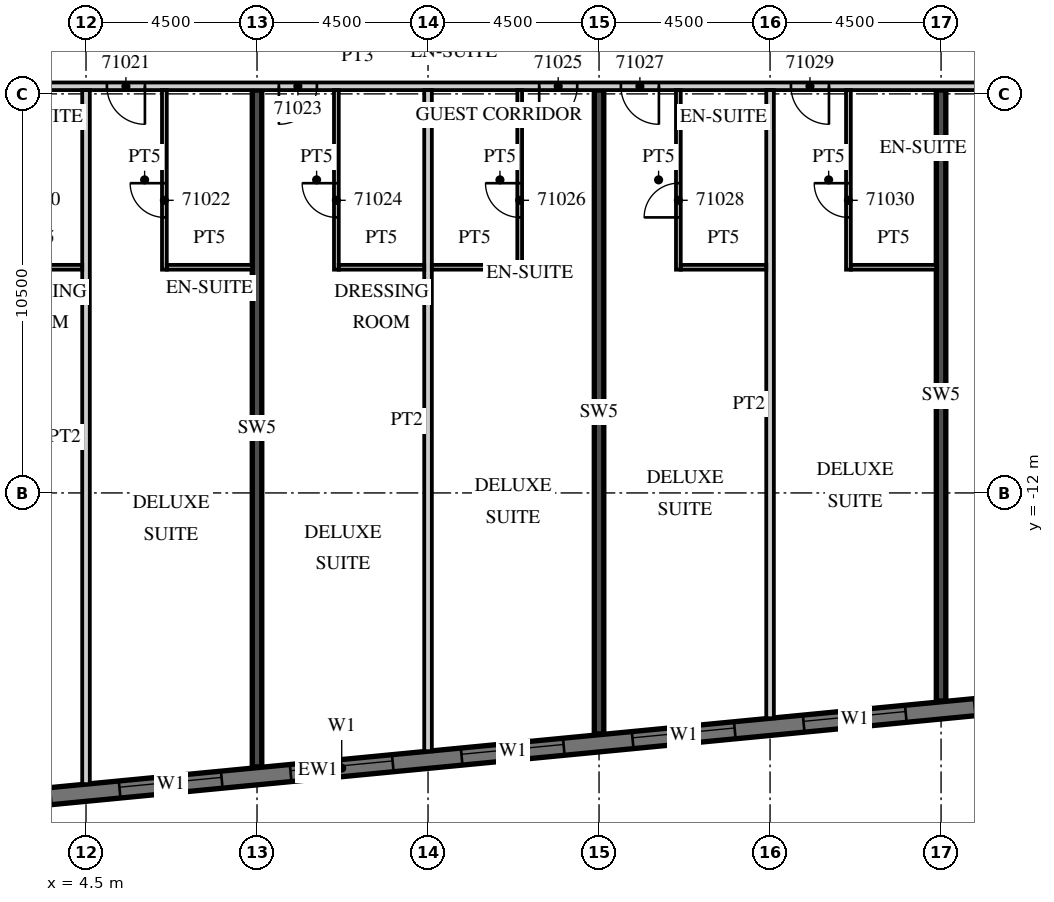
"""IFC4 building model, lengths in metres.
Left out: names, types, materials, properties, quantities, classifications, styles, units other than length and angle.
Written with IfcOpenShell. Run it as: python <this file> out.ifc"""

import sys

from ifc_helpers import new_model, si_unit, direction, frame, frame_2d, origin, place, context, subcontext, project, spatial, rectangle, extrude, element, fill, save


model = new_model("IFC4")
c1 = context("Model", 3, precision=1e-05, world=origin(), true_north=direction((0.0, 1.0)))
c2 = subcontext(c1, "Body", "Model", "MODEL_VIEW")
j1 = project(units=[si_unit("LENGTHUNIT", "METRE"), si_unit("PLANEANGLEUNIT", "RADIAN")], contexts=[c1])
p1 = place(None, origin())
s1 = spatial("IfcSite", under=j1, at=p1, CompositionType="ELEMENT")
p2 = place(p1, origin())
s2 = spatial("IfcBuilding", under=s1, at=p2, CompositionType="ELEMENT")
p3 = place(p2, frame((0.0, 0.0, 285.0)))
s3 = spatial("IfcBuildingStorey", under=s2, at=p3, CompositionType="ELEMENT", Elevation=285.0)
p4 = place(p3, frame((9.0, -19.207, 0.0), z_axis=(0.0, 0.0, 1.0), x_axis=(0.0, 1.0, 0.0)))
e1 = element("IfcWall", 1, at=p4, inside=s3, PredefinedType="SHEAR", context=c2, shape_type="SweptSolid", body=[
    extrude(rectangle(XDim=17.807, YDim=0.25, at=frame_2d((8.904, 0.0))), origin(), (0.0, 0.0, 1.0), 3.3),
])
p5 = place(p3, frame((18.0, -18.341, 0.0), z_axis=(0.0, 0.0, 1.0), x_axis=(0.0, 1.0, 0.0)))
e2 = element("IfcWall", 2, at=p5, inside=s3, PredefinedType="SHEAR", context=c2, shape_type="SweptSolid", body=[
    extrude(rectangle(XDim=16.941, YDim=0.25, at=frame_2d((8.47, 0.0))), origin(), (0.0, 0.0, 1.0), 3.3),
])
p6 = place(p3, frame((27.0, -17.474, 0.0), z_axis=(0.0, 0.0, 1.0), x_axis=(0.0, 1.0, 0.0)))
e3 = element("IfcWall", 3, at=p6, inside=s3, PredefinedType="SHEAR", context=c2, shape_type="SweptSolid", body=[
    extrude(rectangle(XDim=16.074, YDim=0.25, at=frame_2d((8.037, 0.0))), origin(), (0.0, 0.0, 1.0), 3.3),
])
p7 = place(p3, frame((-13.521, -21.624, 0.0), z_axis=(0.0, 0.0, 1.0), x_axis=(0.995396186218, 0.095845878695, 0.0)))
e4 = element("IfcWall", 4, at=p7, inside=s3, PredefinedType="SOLIDWALL", context=c2, shape_type="SweptSolid", body=[
    extrude(rectangle(XDim=48.481, YDim=0.45, at=frame_2d((24.241, 0.0))), origin(), (0.0, 0.0, 1.0), 3.02),
])
p8 = place(p7, frame((0.91, 0.0, 0.45)))
e5 = element("IfcOpeningElement", 5, at=p8, cuts=e4, PredefinedType="OPENING", context=c2, shape_type="SweptSolid", body=[
    extrude(rectangle(XDim=2.7, YDim=2.25, at=frame_2d((1.35, 1.125))), frame((0.0, 0.235, 0.0), z_axis=(0.0, -1.0, 0.0), x_axis=(1.0, 0.0, 0.0)), (0.0, 0.0, 1.0), 0.47),
])
p9 = place(p7, frame((5.431, 0.0, 0.45)))
e6 = element("IfcOpeningElement", 6, at=p9, cuts=e4, PredefinedType="OPENING", context=c2, shape_type="SweptSolid", body=[
    extrude(rectangle(XDim=2.7, YDim=2.25, at=frame_2d((1.35, 1.125))), frame((0.0, 0.235, 0.0), z_axis=(0.0, -1.0, 0.0), x_axis=(1.0, 0.0, 0.0)), (0.0, 0.0, 1.0), 0.47),
])
p10 = place(p7, frame((9.952, 0.0, 0.45)))
e7 = element("IfcOpeningElement", 7, at=p10, cuts=e4, PredefinedType="OPENING", context=c2, shape_type="SweptSolid", body=[
    extrude(rectangle(XDim=2.7, YDim=2.25, at=frame_2d((1.35, 1.125))), frame((0.0, 0.235, 0.0), z_axis=(0.0, -1.0, 0.0), x_axis=(1.0, 0.0, 0.0)), (0.0, 0.0, 1.0), 0.47),
])
p11 = place(p7, frame((14.473, 0.0, 0.45)))
e8 = element("IfcOpeningElement", 8, at=p11, cuts=e4, PredefinedType="OPENING", context=c2, shape_type="SweptSolid", body=[
    extrude(rectangle(XDim=2.7, YDim=2.25, at=frame_2d((1.35, 1.125))), frame((0.0, 0.235, 0.0), z_axis=(0.0, -1.0, 0.0), x_axis=(1.0, 0.0, 0.0)), (0.0, 0.0, 1.0), 0.47),
])
p12 = place(p7, frame((18.994, 0.0, 0.45)))
e9 = element("IfcOpeningElement", 9, at=p12, cuts=e4, PredefinedType="OPENING", context=c2, shape_type="SweptSolid", body=[
    extrude(rectangle(XDim=2.7, YDim=2.25, at=frame_2d((1.35, 1.125))), frame((0.0, 0.235, 0.0), z_axis=(0.0, -1.0, 0.0), x_axis=(1.0, 0.0, 0.0)), (0.0, 0.0, 1.0), 0.47),
])
p13 = place(p7, frame((23.514, 0.0, 0.45)))
e10 = element("IfcOpeningElement", 10, at=p13, cuts=e4, PredefinedType="OPENING", context=c2, shape_type="SweptSolid", body=[
    extrude(rectangle(XDim=2.7, YDim=2.25, at=frame_2d((1.35, 1.125))), frame((0.0, 0.235, 0.0), z_axis=(0.0, -1.0, 0.0), x_axis=(1.0, 0.0, 0.0)), (0.0, 0.0, 1.0), 0.47),
])
p14 = place(p7, frame((28.035, 0.0, 0.45)))
e11 = element("IfcOpeningElement", 11, at=p14, cuts=e4, PredefinedType="OPENING", context=c2, shape_type="SweptSolid", body=[
    extrude(rectangle(XDim=2.7, YDim=2.25, at=frame_2d((1.35, 1.125))), frame((0.0, 0.235, 0.0), z_axis=(0.0, -1.0, 0.0), x_axis=(1.0, 0.0, 0.0)), (0.0, 0.0, 1.0), 0.47),
])
p15 = place(p7, frame((32.556, 0.0, 0.45)))
e12 = element("IfcOpeningElement", 12, at=p15, cuts=e4, PredefinedType="OPENING", context=c2, shape_type="SweptSolid", body=[
    extrude(rectangle(XDim=2.7, YDim=2.25, at=frame_2d((1.35, 1.125))), frame((0.0, 0.235, 0.0), z_axis=(0.0, -1.0, 0.0), x_axis=(1.0, 0.0, 0.0)), (0.0, 0.0, 1.0), 0.47),
])
p16 = place(p7, frame((37.077, 0.0, 0.45)))
e13 = element("IfcOpeningElement", 13, at=p16, cuts=e4, PredefinedType="OPENING", context=c2, shape_type="SweptSolid", body=[
    extrude(rectangle(XDim=2.7, YDim=2.25, at=frame_2d((1.35, 1.125))), frame((0.0, 0.235, 0.0), z_axis=(0.0, -1.0, 0.0), x_axis=(1.0, 0.0, 0.0)), (0.0, 0.0, 1.0), 0.47),
])
p17 = place(p7, frame((41.598, 0.0, 0.45)))
e14 = element("IfcOpeningElement", 14, at=p17, cuts=e4, PredefinedType="OPENING", context=c2, shape_type="SweptSolid", body=[
    extrude(rectangle(XDim=2.7, YDim=2.25, at=frame_2d((1.35, 1.125))), frame((0.0, 0.235, 0.0), z_axis=(0.0, -1.0, 0.0), x_axis=(1.0, 0.0, 0.0)), (0.0, 0.0, 1.0), 0.47),
])
p18 = place(p3, frame((-13.5, -1.3, 0.0), z_axis=(0.0, 0.0, 1.0), x_axis=(1.0, 0.0, 0.0)))
e15 = element("IfcWall", 15, at=p18, inside=s3, PredefinedType="PARTITIONING", context=c2, shape_type="SweptSolid", body=[
    extrude(rectangle(XDim=50.293, YDim=0.2, at=frame_2d((25.146, 0.0))), origin(), (0.0, 0.0, 1.0), 3.02),
])
p19 = place(p18, frame((2.925, 0.0, 0.0)))
e16 = element("IfcOpeningElement", 16, at=p19, cuts=e15, PredefinedType="OPENING", context=c2, shape_type="SweptSolid", body=[
    extrude(rectangle(XDim=1.0, YDim=2.1, at=frame_2d((0.5, 1.05))), frame((0.0, 0.11, 0.0), z_axis=(0.0, -1.0, 0.0), x_axis=(1.0, 0.0, 0.0)), (0.0, 0.0, 1.0), 0.22),
])
p20 = place(p18, frame((6.938, 0.0, 0.0)))
e17 = element("IfcOpeningElement", 17, at=p20, cuts=e15, PredefinedType="OPENING", context=c2, shape_type="SweptSolid", body=[
    extrude(rectangle(XDim=1.2, YDim=2.1, at=frame_2d((0.6, 1.05))), frame((0.0, 0.11, 0.0), z_axis=(0.0, -1.0, 0.0), x_axis=(1.0, 0.0, 0.0)), (0.0, 0.0, 1.0), 0.22),
])
p21 = place(p18, frame((14.075, 0.0, 0.0)))
e18 = element("IfcOpeningElement", 18, at=p21, cuts=e15, PredefinedType="OPENING", context=c2, shape_type="SweptSolid", body=[
    extrude(rectangle(XDim=1.0, YDim=2.1, at=frame_2d((0.5, 1.05))), frame((0.0, 0.11, 0.0), z_axis=(0.0, -1.0, 0.0), x_axis=(1.0, 0.0, 0.0)), (0.0, 0.0, 1.0), 0.22),
])
p22 = place(p18, frame((18.55, 0.0, 0.0)))
e19 = element("IfcOpeningElement", 19, at=p22, cuts=e15, PredefinedType="OPENING", context=c2, shape_type="SweptSolid", body=[
    extrude(rectangle(XDim=1.0, YDim=2.1, at=frame_2d((0.5, 1.05))), frame((0.0, 0.11, 0.0), z_axis=(0.0, -1.0, 0.0), x_axis=(1.0, 0.0, 0.0)), (0.0, 0.0, 1.0), 0.22),
])
p23 = place(p18, frame((23.075, 0.0, 0.0)))
e20 = element("IfcOpeningElement", 20, at=p23, cuts=e15, PredefinedType="OPENING", context=c2, shape_type="SweptSolid", body=[
    extrude(rectangle(XDim=1.0, YDim=2.1, at=frame_2d((0.5, 1.05))), frame((0.0, 0.11, 0.0), z_axis=(0.0, -1.0, 0.0), x_axis=(1.0, 0.0, 0.0)), (0.0, 0.0, 1.0), 0.22),
])
p24 = place(p18, frame((29.925, 0.0, 0.0)))
e21 = element("IfcOpeningElement", 21, at=p24, cuts=e15, PredefinedType="OPENING", context=c2, shape_type="SweptSolid", body=[
    extrude(rectangle(XDim=1.0, YDim=2.1, at=frame_2d((0.5, 1.05))), frame((0.0, 0.11, 0.0), z_axis=(0.0, -1.0, 0.0), x_axis=(1.0, 0.0, 0.0)), (0.0, 0.0, 1.0), 0.22),
])
p25 = place(p18, frame((32.075, 0.0, 0.0)))
e22 = element("IfcOpeningElement", 22, at=p25, cuts=e15, PredefinedType="OPENING", context=c2, shape_type="SweptSolid", body=[
    extrude(rectangle(XDim=1.0, YDim=2.1, at=frame_2d((0.5, 1.05))), frame((0.0, 0.11, 0.0), z_axis=(0.0, -1.0, 0.0), x_axis=(1.0, 0.0, 0.0)), (0.0, 0.0, 1.0), 0.22),
])
p26 = place(p18, frame((36.55, 0.0, 0.0)))
e23 = element("IfcOpeningElement", 23, at=p26, cuts=e15, PredefinedType="OPENING", context=c2, shape_type="SweptSolid", body=[
    extrude(rectangle(XDim=1.0, YDim=2.1, at=frame_2d((0.5, 1.05))), frame((0.0, 0.11, 0.0), z_axis=(0.0, -1.0, 0.0), x_axis=(1.0, 0.0, 0.0)), (0.0, 0.0, 1.0), 0.22),
])
p27 = place(p18, frame((42.938, 0.0, 0.0)))
e24 = element("IfcOpeningElement", 24, at=p27, cuts=e15, PredefinedType="OPENING", context=c2, shape_type="SweptSolid", body=[
    extrude(rectangle(XDim=1.2, YDim=2.1, at=frame_2d((0.6, 1.05))), frame((0.0, 0.11, 0.0), z_axis=(0.0, -1.0, 0.0), x_axis=(1.0, 0.0, 0.0)), (0.0, 0.0, 1.0), 0.22),
])
p28 = place(p3, frame((4.5, -19.663, 0.0), z_axis=(0.0, 0.0, 1.0), x_axis=(0.0, 1.0, 0.0)))
e25 = element("IfcWall", 25, at=p28, inside=s3, PredefinedType="PARTITIONING", context=c2, shape_type="SweptSolid", body=[
    extrude(rectangle(XDim=18.263, YDim=0.2, at=frame_2d((9.132, 0.0))), origin(), (0.0, 0.0, 1.0), 3.02),
])
p29 = place(p3, frame((2.15, -6.062, 0.0), z_axis=(0.0, 0.0, 1.0), x_axis=(1.0, 0.0, 0.0)))
e26 = element("IfcWall", 26, at=p29, inside=s3, PredefinedType="PARTITIONING", context=c2, shape_type="SweptSolid", body=[
    extrude(rectangle(XDim=2.25, YDim=0.125, at=frame_2d((1.125, 0.0))), origin(), (0.0, 0.0, 1.0), 3.02),
])
p30 = place(p3, frame((6.562, -6.125, 0.0), z_axis=(0.0, 0.0, 1.0), x_axis=(0.0, 1.0, 0.0)))
e27 = element("IfcWall", 27, at=p30, inside=s3, PredefinedType="PARTITIONING", context=c2, shape_type="SweptSolid", body=[
    extrude(rectangle(XDim=4.725, YDim=0.125, at=frame_2d((2.363, 0.0))), origin(), (0.0, 0.0, 1.0), 3.02),
])
p31 = place(p30, frame((1.375, 0.0, 0.0)))
e28 = element("IfcOpeningElement", 28, at=p31, cuts=e27, PredefinedType="OPENING", context=c2, shape_type="SweptSolid", body=[
    extrude(rectangle(XDim=0.9, YDim=2.1, at=frame_2d((0.45, 1.05))), frame((0.0, 0.073, 0.0), z_axis=(0.0, -1.0, 0.0), x_axis=(1.0, 0.0, 0.0)), (0.0, 0.0, 1.0), 0.145),
])
p32 = place(p3, frame((6.625, -6.062, 0.0), z_axis=(0.0, 0.0, 1.0), x_axis=(1.0, 0.0, 0.0)))
e29 = element("IfcWall", 29, at=p32, inside=s3, PredefinedType="PARTITIONING", context=c2, shape_type="SweptSolid", body=[
    extrude(rectangle(XDim=2.25, YDim=0.125, at=frame_2d((1.125, 0.0))), origin(), (0.0, 0.0, 1.0), 3.02),
])
p33 = place(p3, frame((13.5, -18.796, 0.0), z_axis=(0.0, 0.0, 1.0), x_axis=(0.0, 1.0, 0.0)))
e30 = element("IfcWall", 30, at=p33, inside=s3, PredefinedType="PARTITIONING", context=c2, shape_type="SweptSolid", body=[
    extrude(rectangle(XDim=17.396, YDim=0.2, at=frame_2d((8.698, 0.0))), origin(), (0.0, 0.0, 1.0), 3.02),
])
p34 = place(p3, frame((11.088, -6.125, 0.0), z_axis=(0.0, 0.0, 1.0), x_axis=(0.0, 1.0, 0.0)))
e31 = element("IfcWall", 31, at=p34, inside=s3, PredefinedType="PARTITIONING", context=c2, shape_type="SweptSolid", body=[
    extrude(rectangle(XDim=4.725, YDim=0.125, at=frame_2d((2.363, 0.0))), origin(), (0.0, 0.0, 1.0), 3.02),
])
p35 = place(p34, frame((1.375, 0.0, 0.0)))
e32 = element("IfcOpeningElement", 32, at=p35, cuts=e31, PredefinedType="OPENING", context=c2, shape_type="SweptSolid", body=[
    extrude(rectangle(XDim=0.9, YDim=2.1, at=frame_2d((0.45, 1.05))), frame((0.0, 0.073, 0.0), z_axis=(0.0, -1.0, 0.0), x_axis=(1.0, 0.0, 0.0)), (0.0, 0.0, 1.0), 0.145),
])
p36 = place(p3, frame((11.15, -6.062, 0.0), z_axis=(0.0, 0.0, 1.0), x_axis=(1.0, 0.0, 0.0)))
e33 = element("IfcWall", 33, at=p36, inside=s3, PredefinedType="PARTITIONING", context=c2, shape_type="SweptSolid", body=[
    extrude(rectangle(XDim=2.25, YDim=0.125, at=frame_2d((1.125, 0.0))), origin(), (0.0, 0.0, 1.0), 3.02),
])
p37 = place(p3, frame((15.912, -6.125, 0.0), z_axis=(0.0, 0.0, 1.0), x_axis=(0.0, 1.0, 0.0)))
e34 = element("IfcWall", 34, at=p37, inside=s3, PredefinedType="PARTITIONING", context=c2, shape_type="SweptSolid", body=[
    extrude(rectangle(XDim=4.725, YDim=0.125, at=frame_2d((2.363, 0.0))), origin(), (0.0, 0.0, 1.0), 3.02),
])
p38 = place(p37, frame((1.375, 0.0, 0.0)))
e35 = element("IfcOpeningElement", 35, at=p38, cuts=e34, PredefinedType="OPENING", context=c2, shape_type="SweptSolid", body=[
    extrude(rectangle(XDim=0.9, YDim=2.1, at=frame_2d((0.45, 1.05))), frame((0.0, 0.073, 0.0), z_axis=(0.0, -1.0, 0.0), x_axis=(1.0, 0.0, 0.0)), (0.0, 0.0, 1.0), 0.145),
])
p39 = place(p3, frame((13.6, -6.062, 0.0), z_axis=(0.0, 0.0, 1.0), x_axis=(1.0, 0.0, 0.0)))
e36 = element("IfcWall", 36, at=p39, inside=s3, PredefinedType="PARTITIONING", context=c2, shape_type="SweptSolid", body=[
    extrude(rectangle(XDim=2.25, YDim=0.125, at=frame_2d((1.125, 0.0))), origin(), (0.0, 0.0, 1.0), 3.02),
])
p40 = place(p3, frame((22.5, -17.929, 0.0), z_axis=(0.0, 0.0, 1.0), x_axis=(0.0, 1.0, 0.0)))
e37 = element("IfcWall", 37, at=p40, inside=s3, PredefinedType="PARTITIONING", context=c2, shape_type="SweptSolid", body=[
    extrude(rectangle(XDim=16.529, YDim=0.2, at=frame_2d((8.265, 0.0))), origin(), (0.0, 0.0, 1.0), 3.02),
])
p41 = place(p3, frame((20.087, -6.125, 0.0), z_axis=(0.0, 0.0, 1.0), x_axis=(0.0, 1.0, 0.0)))
e38 = element("IfcWall", 38, at=p41, inside=s3, PredefinedType="PARTITIONING", context=c2, shape_type="SweptSolid", body=[
    extrude(rectangle(XDim=4.725, YDim=0.125, at=frame_2d((2.363, 0.0))), origin(), (0.0, 0.0, 1.0), 3.02),
])
p42 = place(p41, frame((1.375, 0.0, 0.0)))
e39 = element("IfcOpeningElement", 39, at=p42, cuts=e38, PredefinedType="OPENING", context=c2, shape_type="SweptSolid", body=[
    extrude(rectangle(XDim=0.9, YDim=2.1, at=frame_2d((0.45, 1.05))), frame((0.0, 0.073, 0.0), z_axis=(0.0, -1.0, 0.0), x_axis=(1.0, 0.0, 0.0)), (0.0, 0.0, 1.0), 0.145),
])
p43 = place(p3, frame((20.15, -6.062, 0.0), z_axis=(0.0, 0.0, 1.0), x_axis=(1.0, 0.0, 0.0)))
e40 = element("IfcWall", 40, at=p43, inside=s3, PredefinedType="PARTITIONING", context=c2, shape_type="SweptSolid", body=[
    extrude(rectangle(XDim=2.25, YDim=0.125, at=frame_2d((1.125, 0.0))), origin(), (0.0, 0.0, 1.0), 3.02),
])
p44 = place(p3, frame((24.562, -6.125, 0.0), z_axis=(0.0, 0.0, 1.0), x_axis=(0.0, 1.0, 0.0)))
e41 = element("IfcWall", 41, at=p44, inside=s3, PredefinedType="PARTITIONING", context=c2, shape_type="SweptSolid", body=[
    extrude(rectangle(XDim=4.725, YDim=0.125, at=frame_2d((2.363, 0.0))), origin(), (0.0, 0.0, 1.0), 3.02),
])
p45 = place(p44, frame((1.375, 0.0, 0.0)))
e42 = element("IfcOpeningElement", 42, at=p45, cuts=e41, PredefinedType="OPENING", context=c2, shape_type="SweptSolid", body=[
    extrude(rectangle(XDim=0.9, YDim=2.1, at=frame_2d((0.45, 1.05))), frame((0.0, 0.073, 0.0), z_axis=(0.0, -1.0, 0.0), x_axis=(1.0, 0.0, 0.0)), (0.0, 0.0, 1.0), 0.145),
])
p46 = place(p3, frame((24.625, -6.062, 0.0), z_axis=(0.0, 0.0, 1.0), x_axis=(1.0, 0.0, 0.0)))
e43 = element("IfcWall", 43, at=p46, inside=s3, PredefinedType="PARTITIONING", context=c2, shape_type="SweptSolid", body=[
    extrude(rectangle(XDim=2.25, YDim=0.125, at=frame_2d((1.125, 0.0))), origin(), (0.0, 0.0, 1.0), 3.02),
])
p47 = place(p12, origin())
e44 = element("IfcWindow", 44, at=p47, inside=s3, PartitioningType="SINGLE_PANEL", PredefinedType="WINDOW", context=c2, shape_type="SweptSolid", body=[
    extrude(rectangle(XDim=2.7, YDim=2.25, at=frame_2d((1.35, 1.125))), frame((0.0, 0.09, 0.0), z_axis=(0.0, -1.0, 0.0), x_axis=(1.0, 0.0, 0.0)), (0.0, 0.0, 1.0), 0.06),
])
fill(e9, e44)
p48 = place(p13, origin())
e45 = element("IfcWindow", 45, at=p48, inside=s3, PartitioningType="SINGLE_PANEL", PredefinedType="WINDOW", context=c2, shape_type="SweptSolid", body=[
    extrude(rectangle(XDim=2.7, YDim=2.25, at=frame_2d((1.35, 1.125))), frame((0.0, 0.09, 0.0), z_axis=(0.0, -1.0, 0.0), x_axis=(1.0, 0.0, 0.0)), (0.0, 0.0, 1.0), 0.06),
])
fill(e10, e45)
p49 = place(p14, origin())
e46 = element("IfcWindow", 46, at=p49, inside=s3, PartitioningType="SINGLE_PANEL", PredefinedType="WINDOW", context=c2, shape_type="SweptSolid", body=[
    extrude(rectangle(XDim=2.7, YDim=2.25, at=frame_2d((1.35, 1.125))), frame((0.0, 0.09, 0.0), z_axis=(0.0, -1.0, 0.0), x_axis=(1.0, 0.0, 0.0)), (0.0, 0.0, 1.0), 0.06),
])
fill(e11, e46)
p50 = place(p15, origin())
e47 = element("IfcWindow", 47, at=p50, inside=s3, PartitioningType="SINGLE_PANEL", PredefinedType="WINDOW", context=c2, shape_type="SweptSolid", body=[
    extrude(rectangle(XDim=2.7, YDim=2.25, at=frame_2d((1.35, 1.125))), frame((0.0, 0.09, 0.0), z_axis=(0.0, -1.0, 0.0), x_axis=(1.0, 0.0, 0.0)), (0.0, 0.0, 1.0), 0.06),
])
fill(e12, e47)
p51 = place(p16, origin())
e48 = element("IfcWindow", 48, at=p51, inside=s3, PartitioningType="SINGLE_PANEL", PredefinedType="WINDOW", context=c2, shape_type="SweptSolid", body=[
    extrude(rectangle(XDim=2.7, YDim=2.25, at=frame_2d((1.35, 1.125))), frame((0.0, 0.09, 0.0), z_axis=(0.0, -1.0, 0.0), x_axis=(1.0, 0.0, 0.0)), (0.0, 0.0, 1.0), 0.06),
])
fill(e13, e48)
p52 = place(p22, origin())
e49 = element("IfcDoor", 49, at=p52, inside=s3, OperationType="SINGLE_SWING_RIGHT", PredefinedType="DOOR", context=c2, shape_type="SweptSolid", body=[
    extrude(rectangle(XDim=1.0, YDim=2.1, at=frame_2d((0.5, 1.05))), frame((0.0, 0.025, 0.0), z_axis=(0.0, -1.0, 0.0), x_axis=(1.0, 0.0, 0.0)), (0.0, 0.0, 1.0), 0.05),
])
fill(e19, e49)
p53 = place(p31, origin())
e50 = element("IfcDoor", 50, at=p53, inside=s3, OperationType="SINGLE_SWING_RIGHT", PredefinedType="DOOR", context=c2, shape_type="SweptSolid", body=[
    extrude(rectangle(XDim=0.9, YDim=2.1, at=frame_2d((0.45, 1.05))), frame((0.0, 0.025, 0.0), z_axis=(0.0, -1.0, 0.0), x_axis=(1.0, 0.0, 0.0)), (0.0, 0.0, 1.0), 0.05),
])
fill(e28, e50)
p54 = place(p23, origin())
e51 = element("IfcDoor", 51, at=p54, inside=s3, OperationType="SINGLE_SWING_LEFT", PredefinedType="DOOR", context=c2, shape_type="SweptSolid", body=[
    extrude(rectangle(XDim=1.0, YDim=2.1, at=frame_2d((0.5, 1.05))), frame((0.0, 0.025, 0.0), z_axis=(0.0, -1.0, 0.0), x_axis=(1.0, 0.0, 0.0)), (0.0, 0.0, 1.0), 0.05),
])
fill(e20, e51)
p55 = place(p35, origin())
e52 = element("IfcDoor", 52, at=p55, inside=s3, OperationType="SINGLE_SWING_RIGHT", PredefinedType="DOOR", context=c2, shape_type="SweptSolid", body=[
    extrude(rectangle(XDim=0.9, YDim=2.1, at=frame_2d((0.45, 1.05))), frame((0.0, 0.025, 0.0), z_axis=(0.0, -1.0, 0.0), x_axis=(1.0, 0.0, 0.0)), (0.0, 0.0, 1.0), 0.05),
])
fill(e32, e52)
p56 = place(p24, origin())
e53 = element("IfcDoor", 53, at=p56, inside=s3, OperationType="SINGLE_SWING_LEFT", PredefinedType="DOOR", context=c2, shape_type="SweptSolid", body=[
    extrude(rectangle(XDim=1.0, YDim=2.1, at=frame_2d((0.5, 1.05))), frame((0.0, 0.025, 0.0), z_axis=(0.0, -1.0, 0.0), x_axis=(1.0, 0.0, 0.0)), (0.0, 0.0, 1.0), 0.05),
])
fill(e21, e53)
p57 = place(p38, origin())
e54 = element("IfcDoor", 54, at=p57, inside=s3, OperationType="SINGLE_SWING_RIGHT", PredefinedType="DOOR", context=c2, shape_type="SweptSolid", body=[
    extrude(rectangle(XDim=0.9, YDim=2.1, at=frame_2d((0.45, 1.05))), frame((0.0, 0.025, 0.0), z_axis=(0.0, -1.0, 0.0), x_axis=(1.0, 0.0, 0.0)), (0.0, 0.0, 1.0), 0.05),
])
fill(e35, e54)
p58 = place(p25, origin())
e55 = element("IfcDoor", 55, at=p58, inside=s3, OperationType="SINGLE_SWING_RIGHT", PredefinedType="DOOR", context=c2, shape_type="SweptSolid", body=[
    extrude(rectangle(XDim=1.0, YDim=2.1, at=frame_2d((0.5, 1.05))), frame((0.0, 0.025, 0.0), z_axis=(0.0, -1.0, 0.0), x_axis=(1.0, 0.0, 0.0)), (0.0, 0.0, 1.0), 0.05),
])
fill(e22, e55)
p59 = place(p42, origin())
e56 = element("IfcDoor", 56, at=p59, inside=s3, OperationType="SINGLE_SWING_LEFT", PredefinedType="DOOR", context=c2, shape_type="SweptSolid", body=[
    extrude(rectangle(XDim=0.9, YDim=2.1, at=frame_2d((0.45, 1.05))), frame((0.0, 0.025, 0.0), z_axis=(0.0, -1.0, 0.0), x_axis=(1.0, 0.0, 0.0)), (0.0, 0.0, 1.0), 0.05),
])
fill(e39, e56)
p60 = place(p26, origin())
e57 = element("IfcDoor", 57, at=p60, inside=s3, OperationType="SINGLE_SWING_RIGHT", PredefinedType="DOOR", context=c2, shape_type="SweptSolid", body=[
    extrude(rectangle(XDim=1.0, YDim=2.1, at=frame_2d((0.5, 1.05))), frame((0.0, 0.025, 0.0), z_axis=(0.0, -1.0, 0.0), x_axis=(1.0, 0.0, 0.0)), (0.0, 0.0, 1.0), 0.05),
])
fill(e23, e57)
p61 = place(p45, origin())
e58 = element("IfcDoor", 58, at=p61, inside=s3, OperationType="SINGLE_SWING_RIGHT", PredefinedType="DOOR", context=c2, shape_type="SweptSolid", body=[
    extrude(rectangle(XDim=0.9, YDim=2.1, at=frame_2d((0.45, 1.05))), frame((0.0, 0.025, 0.0), z_axis=(0.0, -1.0, 0.0), x_axis=(1.0, 0.0, 0.0)), (0.0, 0.0, 1.0), 0.05),
])
fill(e42, e58)
save(model, sys.argv[1])
